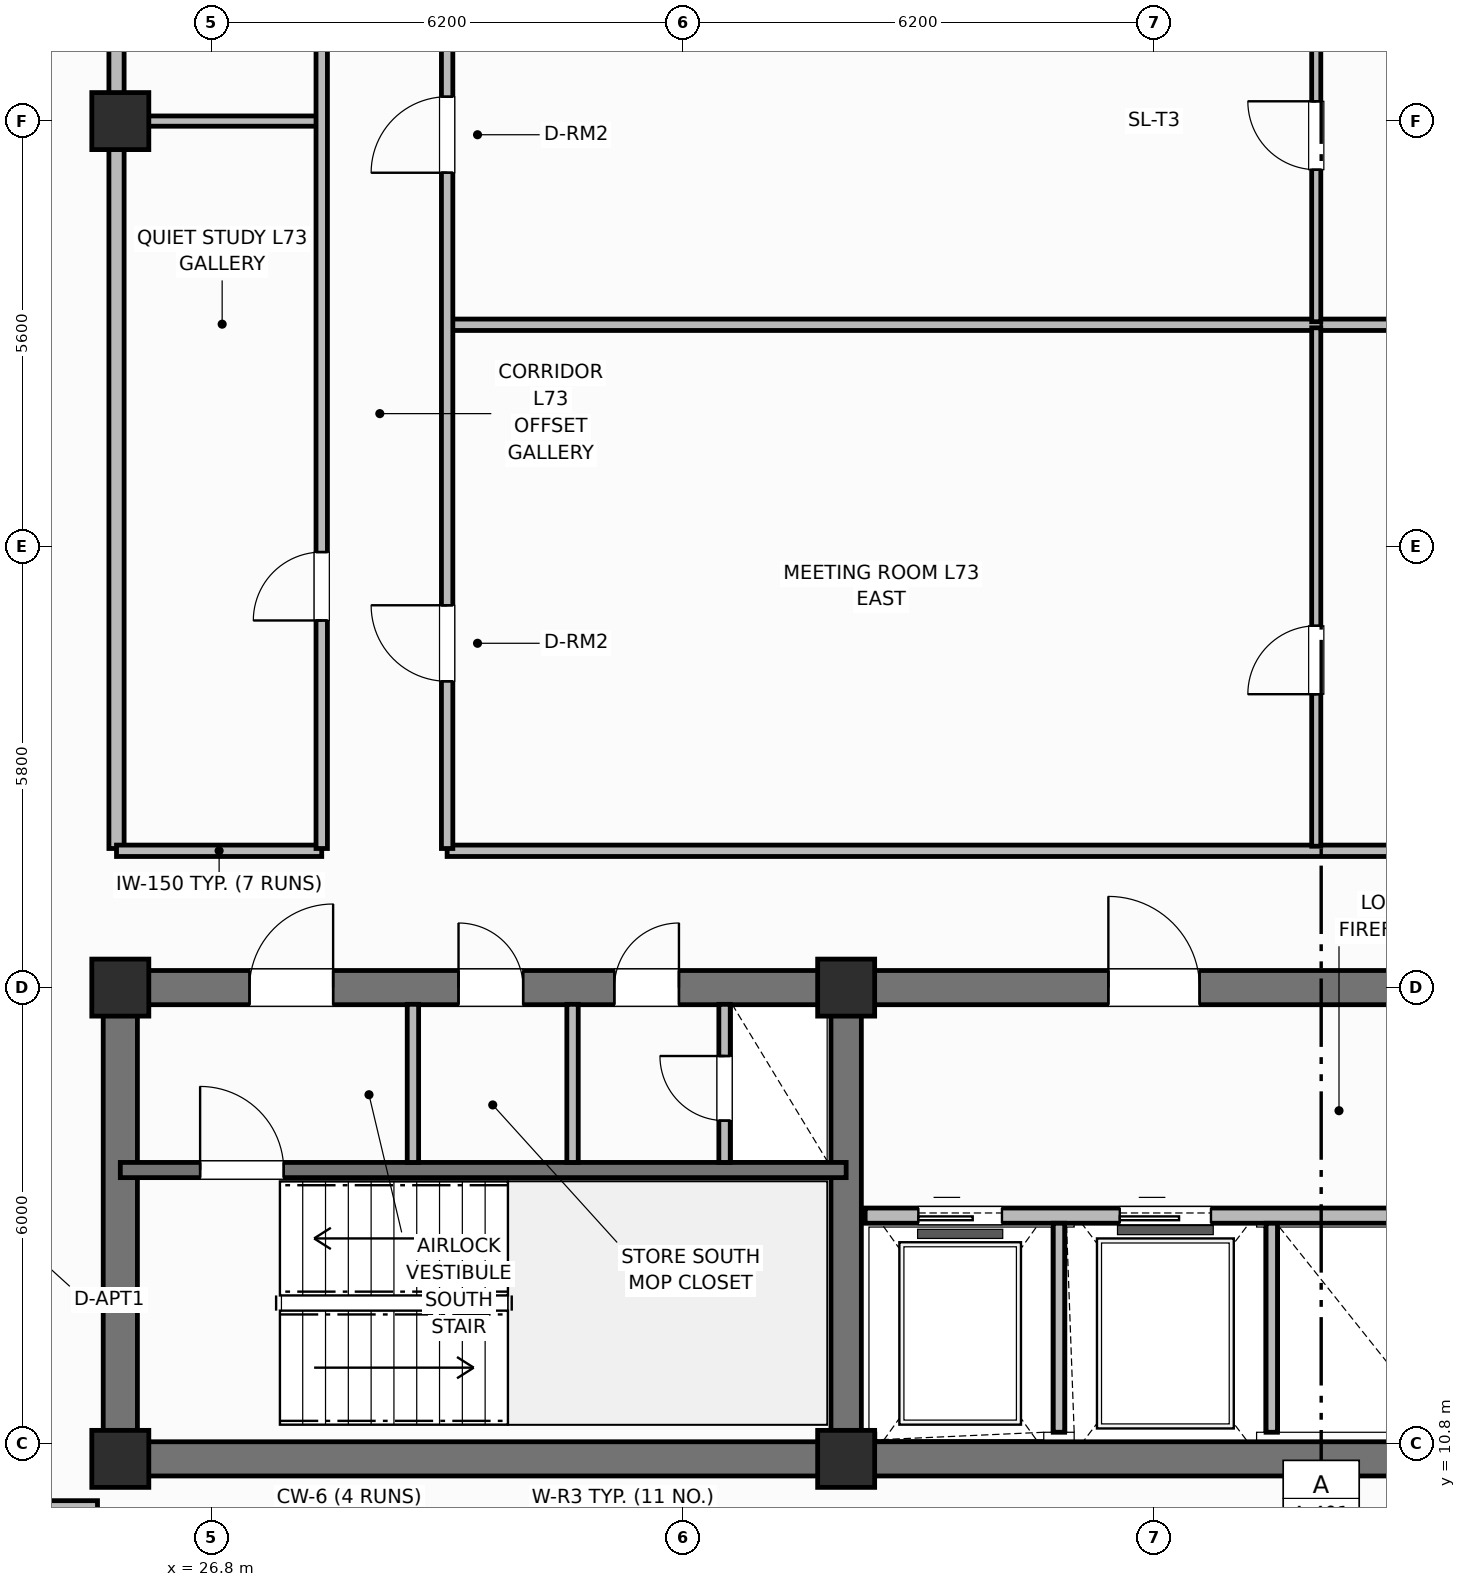
"""IFC4 building model, lengths in metres.
Left out: names, types, materials, properties, quantities, classifications, styles, units other than length and angle.
Written with IfcOpenShell. Run it as: python <this file> out.ifc"""

import sys

from ifc_helpers import new_model, si_unit, direction, frame, frame_2d, origin, origin_2d, place, context, subcontext, project, spatial, rectangle, extrude, element, fill, save


model = new_model("IFC4")
c1 = context("Model", 3, precision=1e-05, world=origin(), true_north=direction((0.0, 1.0)))
c2 = subcontext(c1, "Body", "Model", "MODEL_VIEW")
j1 = project(units=[si_unit("LENGTHUNIT", "METRE"), si_unit("PLANEANGLEUNIT", "RADIAN")], contexts=[c1])
p1 = place(None, origin())
s1 = spatial("IfcSite", under=j1, at=p1, CompositionType="ELEMENT")
p2 = place(p1, origin())
s2 = spatial("IfcBuilding", under=s1, at=p2, CompositionType="ELEMENT")
p3 = place(p2, frame((0.0, 0.0, 289.8)))
s3 = spatial("IfcBuildingStorey", under=s2, at=p3, CompositionType="ELEMENT", Elevation=289.8)
p4 = place(p3, frame((52.8, 10.6, 0.0), z_axis=(0.0, 0.0, 1.0), x_axis=(-1.0, 0.0, 0.0)))
e1 = element("IfcWall", 1, at=p4, inside=s3, PredefinedType="SHEAR", context=c2, shape_type="SweptSolid", body=[
    extrude(rectangle(XDim=27.2, YDim=0.45, at=frame_2d((13.6, 0.0))), origin(), (0.0, 0.0, 1.0), 3.7),
])
p5 = place(p3, frame((25.6, 10.825, 0.0), z_axis=(0.0, 0.0, 1.0), x_axis=(0.0, 1.0, 0.0)))
e2 = element("IfcWall", 2, at=p5, inside=s3, PredefinedType="SHEAR", context=c2, shape_type="SweptSolid", body=[
    extrude(rectangle(XDim=5.75, YDim=0.45, at=frame_2d((2.875, 0.0))), origin(), (0.0, 0.0, 1.0), 3.7),
])
p6 = place(p3, frame((25.6, 16.8, 0.0), z_axis=(0.0, 0.0, 1.0), x_axis=(1.0, 0.0, 0.0)))
e3 = element("IfcWall", 3, at=p6, inside=s3, PredefinedType="SHEAR", context=c2, shape_type="SweptSolid", body=[
    extrude(rectangle(XDim=27.2, YDim=0.45, at=frame_2d((13.6, 0.0))), origin(), (0.0, 0.0, 1.0), 3.7),
])
p7 = place(p6, frame((1.7, 0.0, 0.0)))
e4 = element("IfcOpeningElement", 4, at=p7, cuts=e3, PredefinedType="OPENING", context=c2, shape_type="SweptSolid", body=[
    extrude(rectangle(XDim=1.1, YDim=2.15, at=frame_2d((0.55, 1.075))), frame((0.0, 0.235, 0.0), z_axis=(0.0, -1.0, 0.0), x_axis=(1.0, 0.0, 0.0)), (0.0, 0.0, 1.0), 0.47),
])
p8 = place(p6, frame((4.45, 0.0, 0.0)))
e5 = element("IfcOpeningElement", 5, at=p8, cuts=e3, PredefinedType="OPENING", context=c2, shape_type="SweptSolid", body=[
    extrude(rectangle(XDim=0.85, YDim=2.1, at=frame_2d((0.425, 1.05))), frame((0.0, 0.235, 0.0), z_axis=(0.0, -1.0, 0.0), x_axis=(1.0, 0.0, 0.0)), (0.0, 0.0, 1.0), 0.47),
])
p9 = place(p6, frame((6.5, 0.0, 0.0)))
e6 = element("IfcOpeningElement", 6, at=p9, cuts=e3, PredefinedType="OPENING", context=c2, shape_type="SweptSolid", body=[
    extrude(rectangle(XDim=0.85, YDim=2.1, at=frame_2d((0.425, 1.05))), frame((0.0, 0.235, 0.0), z_axis=(0.0, -1.0, 0.0), x_axis=(1.0, 0.0, 0.0)), (0.0, 0.0, 1.0), 0.47),
])
p10 = place(p6, frame((13.0, 0.0, 0.0)))
e7 = element("IfcOpeningElement", 7, at=p10, cuts=e3, PredefinedType="OPENING", context=c2, shape_type="SweptSolid", body=[
    extrude(rectangle(XDim=1.2, YDim=2.15, at=frame_2d((0.6, 1.075))), frame((0.0, 0.235, 0.0), z_axis=(0.0, -1.0, 0.0), x_axis=(1.0, 0.0, 0.0)), (0.0, 0.0, 1.0), 0.47),
])
p11 = place(p6, frame((19.8, 0.0, 0.0)))
e8 = element("IfcOpeningElement", 8, at=p11, cuts=e3, PredefinedType="OPENING", context=c2, shape_type="SweptSolid", body=[
    extrude(rectangle(XDim=0.85, YDim=2.1, at=frame_2d((0.425, 1.05))), frame((0.0, 0.235, 0.0), z_axis=(0.0, -1.0, 0.0), x_axis=(1.0, 0.0, 0.0)), (0.0, 0.0, 1.0), 0.47),
])
p12 = place(p6, frame((24.2, 0.0, 0.0)))
e9 = element("IfcOpeningElement", 9, at=p12, cuts=e3, PredefinedType="OPENING", context=c2, shape_type="SweptSolid", body=[
    extrude(rectangle(XDim=0.85, YDim=2.1, at=frame_2d((0.425, 1.05))), frame((0.0, 0.235, 0.0), z_axis=(0.0, -1.0, 0.0), x_axis=(1.0, 0.0, 0.0)), (0.0, 0.0, 1.0), 0.47),
])
p13 = place(p3, frame((35.15, 10.825, 0.0), z_axis=(0.0, 0.0, 1.0), x_axis=(0.0, 1.0, 0.0)))
e10 = element("IfcWall", 10, at=p13, inside=s3, PredefinedType="SHEAR", context=c2, shape_type="SweptSolid", body=[
    extrude(rectangle(XDim=5.75, YDim=0.4, at=frame_2d((2.875, 0.0))), origin(), (0.0, 0.0, 1.0), 3.7),
])
for number, where, z_axis, x_axis in (
    (11, (25.6, 10.6, 0.0), (0.0, 0.0, 1.0), (1.0, 0.0, 0.0)),
    (12, (25.6, 16.8, 0.0), (0.0, 0.0, 1.0), (1.0, 0.0, 0.0)),
    (13, (35.15, 10.6, 0.0), (0.0, 0.0, 1.0), (1.0, 0.0, 0.0)),
    (14, (35.15, 16.8, 0.0), (0.0, 0.0, 1.0), (1.0, 0.0, 0.0)),
    (15, (25.6, 28.2, 0.0), (0.0, 0.0, 1.0), (1.0, 0.0, 0.0)),
):
    element("IfcColumn", number, at=place(p3, frame(where, z_axis=z_axis, x_axis=x_axis)), inside=s3, PredefinedType="COLUMN", context=c2, shape_type="SweptSolid", body=[
        extrude(rectangle(XDim=0.75, YDim=0.75, at=origin_2d()), origin(), (0.0, 0.0, 1.0), 3.7),
    ])
p14 = place(p3, frame((25.6, 14.4, 0.0), z_axis=(0.0, 0.0, 1.0), x_axis=(1.0, 0.0, 0.0)))
e16 = element("IfcWall", 16, at=p14, inside=s3, PredefinedType="SHEAR", context=c2, shape_type="SweptSolid", body=[
    extrude(rectangle(XDim=9.55, YDim=0.2, at=frame_2d((4.775, 0.0))), origin(), (0.0, 0.0, 1.0), 3.7),
])
p15 = place(p14, frame((1.05, 0.0, 0.0)))
e17 = element("IfcOpeningElement", 17, at=p15, cuts=e16, PredefinedType="OPENING", context=c2, shape_type="SweptSolid", body=[
    extrude(rectangle(XDim=1.1, YDim=2.15, at=frame_2d((0.55, 1.075))), frame((0.0, 0.11, 0.0), z_axis=(0.0, -1.0, 0.0), x_axis=(1.0, 0.0, 0.0)), (0.0, 0.0, 1.0), 0.22),
])
for number, where, z_axis, x_axis in (
    (18, (29.45, 14.5, 0.0), (0.0, 0.0, 1.0), (0.0, 1.0, 0.0)),
    (19, (31.55, 14.5, 0.0), (0.0, 0.0, 1.0), (0.0, 1.0, 0.0)),
):
    element("IfcWall", number, at=place(p3, frame(where, z_axis=z_axis, x_axis=x_axis)), inside=s3, PredefinedType="PARTITIONING", context=c2, shape_type="SweptSolid", body=[
        extrude(rectangle(XDim=2.08, YDim=0.15, at=frame_2d((1.04, 0.0))), origin(), (0.0, 0.0, 1.0), 2.56),
    ])
p16 = place(p3, frame((33.55, 14.5, 0.0), z_axis=(0.0, 0.0, 1.0), x_axis=(0.0, 1.0, 0.0)))
e20 = element("IfcWall", 20, at=p16, inside=s3, PredefinedType="PARTITIONING", context=c2, shape_type="SweptSolid", body=[
    extrude(rectangle(XDim=2.08, YDim=0.15, at=frame_2d((1.04, 0.0))), origin(), (0.0, 0.0, 1.0), 2.56),
])
p17 = place(p16, frame((0.55, 0.0, 0.0)))
e21 = element("IfcOpeningElement", 21, at=p17, cuts=e20, PredefinedType="OPENING", context=c2, shape_type="SweptSolid", body=[
    extrude(rectangle(XDim=0.85, YDim=2.05, at=frame_2d((0.425, 1.025))), frame((0.0, 0.085, 0.0), z_axis=(0.0, -1.0, 0.0), x_axis=(1.0, 0.0, 0.0)), (0.0, 0.0, 1.0), 0.17),
])
p18 = place(p3, frame((35.4, 13.8, 0.0), z_axis=(0.0, 0.0, 1.0), x_axis=(1.0, 0.0, 0.0)))
e22 = element("IfcWall", 22, at=p18, inside=s3, PredefinedType="PARTITIONING", context=c2, shape_type="SweptSolid", body=[
    extrude(rectangle(XDim=7.6, YDim=0.2, at=frame_2d((3.8, 0.0))), origin(), (0.0, 0.0, 1.0), 2.33),
])
p19 = place(p18, frame((0.7, 0.0, 0.0)))
e23 = element("IfcOpeningElement", 23, at=p19, cuts=e22, PredefinedType="OPENING", context=c2, shape_type="SweptSolid", body=[
    extrude(rectangle(XDim=1.1, YDim=2.15, at=frame_2d((0.55, 1.075))), frame((0.0, 0.11, 0.0), z_axis=(0.0, -1.0, 0.0), x_axis=(1.0, 0.0, 0.0)), (0.0, 0.0, 1.0), 0.22),
])
p20 = place(p18, frame((3.35, 0.0, 0.0)))
e24 = element("IfcOpeningElement", 24, at=p20, cuts=e22, PredefinedType="OPENING", context=c2, shape_type="SweptSolid", body=[
    extrude(rectangle(XDim=1.2, YDim=2.15, at=frame_2d((0.6, 1.075))), frame((0.0, 0.11, 0.0), z_axis=(0.0, -1.0, 0.0), x_axis=(1.0, 0.0, 0.0)), (0.0, 0.0, 1.0), 0.22),
])
for number, where, z_axis, x_axis in (
    (25, (37.95, 10.95, 0.0), (0.0, 0.0, 1.0), (0.0, 1.0, 0.0)),
    (26, (40.75, 10.95, 0.0), (0.0, 0.0, 1.0), (0.0, 1.0, 0.0)),
):
    element("IfcWall", number, at=place(p3, frame(where, z_axis=z_axis, x_axis=x_axis)), inside=s3, PredefinedType="PARTITIONING", context=c2, shape_type="SweptSolid", body=[
        extrude(rectangle(XDim=2.75, YDim=0.15, at=frame_2d((1.375, 0.0))), origin(), (0.0, 0.0, 1.0), 2.56),
    ])
p21 = place(p3, frame((25.55, 18.63, 0.0), z_axis=(0.0, 0.0, 1.0), x_axis=(0.0, 1.0, 0.0)))
e27 = element("IfcWall", 27, at=p21, inside=s3, PredefinedType="PARTITIONING", context=c2, shape_type="SweptSolid", body=[
    extrude(rectangle(XDim=19.14, YDim=0.2, at=frame_2d((9.57, 0.0))), origin(), (0.0, 0.0, 1.0), 2.56),
])
p22 = place(p3, frame((25.55, 18.6, 0.0), z_axis=(0.0, 0.0, 1.0), x_axis=(1.0, 0.0, 0.0)))
e28 = element("IfcWall", 28, at=p22, inside=s3, PredefinedType="PARTITIONING", context=c2, shape_type="SweptSolid", body=[
    extrude(rectangle(XDim=2.7, YDim=0.15, at=frame_2d((1.35, 0.0))), origin(), (0.0, 0.0, 1.0), 2.56),
])
p23 = place(p3, frame((29.9, 18.6, 0.0), z_axis=(0.0, 0.0, 1.0), x_axis=(1.0, 0.0, 0.0)))
e29 = element("IfcWall", 29, at=p23, inside=s3, PredefinedType="PARTITIONING", context=c2, shape_type="SweptSolid", body=[
    extrude(rectangle(XDim=22.95, YDim=0.15, at=frame_2d((11.475, 0.0))), origin(), (0.0, 0.0, 1.0), 2.56),
])
p24 = place(p3, frame((25.6, 28.2, 0.0), z_axis=(0.0, 0.0, 1.0), x_axis=(1.0, 0.0, 0.0)))
e30 = element("IfcWall", 30, at=p24, inside=s3, PredefinedType="PARTITIONING", context=c2, shape_type="SweptSolid", body=[
    extrude(rectangle(XDim=2.66, YDim=0.135, at=frame_2d((1.33, 0.0))), origin(), (0.0, 0.0, 1.0), 2.56),
])
p25 = place(p3, frame((29.93, 25.521, 0.0), z_axis=(0.0, 0.0, 1.0), x_axis=(1.0, 0.0, 0.0)))
e31 = element("IfcWall", 31, at=p25, inside=s3, PredefinedType="PARTITIONING", context=c2, shape_type="SweptSolid", body=[
    extrude(rectangle(XDim=22.87, YDim=0.15, at=frame_2d((11.435, 0.0))), origin(), (0.0, 0.0, 1.0), 2.56),
])
p26 = place(p3, frame((41.335, 18.66, 0.0), z_axis=(0.0, 0.0, 1.0), x_axis=(0.0, 1.0, 0.0)))
e32 = element("IfcWall", 32, at=p26, inside=s3, PredefinedType="PARTITIONING", context=c2, shape_type="SweptSolid", body=[
    extrude(rectangle(XDim=6.821, YDim=0.12, at=frame_2d((3.41, 0.0))), origin(), (0.0, 0.0, 1.0), 2.56),
])
p27 = place(p26, frame((2.0, 0.0, 0.0)))
e33 = element("IfcOpeningElement", 33, at=p27, cuts=e32, PredefinedType="OPENING", context=c2, shape_type="SweptSolid", body=[
    extrude(rectangle(XDim=0.9, YDim=2.1, at=frame_2d((0.45, 1.05))), frame((0.0, 0.07, 0.0), z_axis=(0.0, -1.0, 0.0), x_axis=(1.0, 0.0, 0.0)), (0.0, 0.0, 1.0), 0.14),
])
p28 = place(p3, frame((41.335, 25.56, 0.0), z_axis=(0.0, 0.0, 1.0), x_axis=(0.0, 1.0, 0.0)))
e34 = element("IfcWall", 34, at=p28, inside=s3, PredefinedType="PARTITIONING", context=c2, shape_type="SweptSolid", body=[
    extrude(rectangle(XDim=12.18, YDim=0.12, at=frame_2d((6.09, 0.0))), origin(), (0.0, 0.0, 1.0), 2.56),
])
p29 = place(p28, frame((2.0, 0.0, 0.0)))
e35 = element("IfcOpeningElement", 35, at=p29, cuts=e34, PredefinedType="OPENING", context=c2, shape_type="SweptSolid", body=[
    extrude(rectangle(XDim=0.9, YDim=2.1, at=frame_2d((0.45, 1.05))), frame((0.0, 0.07, 0.0), z_axis=(0.0, -1.0, 0.0), x_axis=(1.0, 0.0, 0.0)), (0.0, 0.0, 1.0), 0.14),
])
p30 = place(p3, frame((28.25, 18.63, 0.0), z_axis=(0.0, 0.0, 1.0), x_axis=(0.0, 1.0, 0.0)))
e36 = element("IfcWall", 36, at=p30, inside=s3, PredefinedType="PARTITIONING", context=c2, shape_type="SweptSolid", body=[
    extrude(rectangle(XDim=19.14, YDim=0.15, at=frame_2d((9.57, 0.0))), origin(), (0.0, 0.0, 1.0), 2.56),
])
p31 = place(p30, frame((3.0, 0.0, 0.0)))
e37 = element("IfcOpeningElement", 37, at=p31, cuts=e36, PredefinedType="OPENING", context=c2, shape_type="SweptSolid", body=[
    extrude(rectangle(XDim=0.9, YDim=2.1, at=frame_2d((0.45, 1.05))), frame((0.0, 0.085, 0.0), z_axis=(0.0, -1.0, 0.0), x_axis=(1.0, 0.0, 0.0)), (0.0, 0.0, 1.0), 0.17),
])
p32 = place(p30, frame((11.5, 0.0, 0.0)))
e38 = element("IfcOpeningElement", 38, at=p32, cuts=e36, PredefinedType="OPENING", context=c2, shape_type="SweptSolid", body=[
    extrude(rectangle(XDim=0.9, YDim=2.1, at=frame_2d((0.45, 1.05))), frame((0.0, 0.085, 0.0), z_axis=(0.0, -1.0, 0.0), x_axis=(1.0, 0.0, 0.0)), (0.0, 0.0, 1.0), 0.17),
])
p33 = place(p3, frame((29.9, 18.63, 0.0), z_axis=(0.0, 0.0, 1.0), x_axis=(0.0, 1.0, 0.0)))
e39 = element("IfcWall", 39, at=p33, inside=s3, PredefinedType="PARTITIONING", context=c2, shape_type="SweptSolid", body=[
    extrude(rectangle(XDim=19.14, YDim=0.15, at=frame_2d((9.57, 0.0))), origin(), (0.0, 0.0, 1.0), 2.56),
])
p34 = place(p33, frame((2.2, 0.0, 0.0)))
e40 = element("IfcOpeningElement", 40, at=p34, cuts=e39, PredefinedType="OPENING", context=c2, shape_type="SweptSolid", body=[
    extrude(rectangle(XDim=1.0, YDim=2.15, at=frame_2d((0.5, 1.075))), frame((0.0, 0.085, 0.0), z_axis=(0.0, -1.0, 0.0), x_axis=(1.0, 0.0, 0.0)), (0.0, 0.0, 1.0), 0.17),
])
p35 = place(p33, frame((8.89, 0.0, 0.0)))
e41 = element("IfcOpeningElement", 41, at=p35, cuts=e39, PredefinedType="OPENING", context=c2, shape_type="SweptSolid", body=[
    extrude(rectangle(XDim=1.0, YDim=2.15, at=frame_2d((0.5, 1.075))), frame((0.0, 0.085, 0.0), z_axis=(0.0, -1.0, 0.0), x_axis=(1.0, 0.0, 0.0)), (0.0, 0.0, 1.0), 0.17),
])
p36 = place(p3, frame((21.546, 9.95, 0.0), z_axis=(0.0, 0.0, 1.0), x_axis=(1.0, 0.0, 0.0)))
e42 = element("IfcWall", 42, at=p36, inside=s3, PredefinedType="PARTITIONING", context=c2, shape_type="SweptSolid", body=[
    extrude(rectangle(XDim=3.754, YDim=0.2, at=frame_2d((1.877, 0.0))), origin(), (0.0, 0.0, 1.0), 2.56),
])
p37 = place(p15, origin())
e43 = element("IfcDoor", 43, at=p37, inside=s3, OperationType="SINGLE_SWING_LEFT", PredefinedType="DOOR", context=c2, shape_type="SweptSolid", body=[
    extrude(rectangle(XDim=1.1, YDim=2.15, at=frame_2d((0.55, 1.075))), frame((0.0, 0.025, 0.0), z_axis=(0.0, -1.0, 0.0), x_axis=(1.0, 0.0, 0.0)), (0.0, 0.0, 1.0), 0.05),
])
fill(e17, e43)
p38 = place(p17, origin())
e44 = element("IfcDoor", 44, at=p38, inside=s3, OperationType="SINGLE_SWING_RIGHT", PredefinedType="TRAPDOOR", context=c2, shape_type="SweptSolid", body=[
    extrude(rectangle(XDim=0.85, YDim=2.05, at=frame_2d((0.425, 1.025))), frame((0.0, 0.025, 0.0), z_axis=(0.0, -1.0, 0.0), x_axis=(1.0, 0.0, 0.0)), (0.0, 0.0, 1.0), 0.05),
])
fill(e21, e44)
p39 = place(p19, origin())
e45 = element("IfcDoor", 45, at=p39, inside=s3, OperationType="SLIDING_TO_LEFT", PredefinedType="DOOR", context=c2, shape_type="SweptSolid", body=[
    extrude(rectangle(XDim=1.1, YDim=2.15, at=frame_2d((0.55, 1.075))), frame((0.0, 0.025, 0.0), z_axis=(0.0, -1.0, 0.0), x_axis=(1.0, 0.0, 0.0)), (0.0, 0.0, 1.0), 0.05),
])
fill(e23, e45)
p40 = place(p20, origin())
e46 = element("IfcDoor", 46, at=p40, inside=s3, OperationType="SLIDING_TO_LEFT", PredefinedType="DOOR", context=c2, shape_type="SweptSolid", body=[
    extrude(rectangle(XDim=1.2, YDim=2.15, at=frame_2d((0.6, 1.075))), frame((0.0, 0.025, 0.0), z_axis=(0.0, -1.0, 0.0), x_axis=(1.0, 0.0, 0.0)), (0.0, 0.0, 1.0), 0.05),
])
fill(e24, e46)
p41 = place(p27, origin())
e47 = element("IfcDoor", 47, at=p41, inside=s3, OperationType="SINGLE_SWING_LEFT", PredefinedType="DOOR", context=c2, shape_type="SweptSolid", body=[
    extrude(rectangle(XDim=0.9, YDim=2.1, at=frame_2d((0.45, 1.05))), frame((0.0, 0.025, 0.0), z_axis=(0.0, -1.0, 0.0), x_axis=(1.0, 0.0, 0.0)), (0.0, 0.0, 1.0), 0.05),
])
fill(e33, e47)
p42 = place(p29, origin())
e48 = element("IfcDoor", 48, at=p42, inside=s3, OperationType="SINGLE_SWING_RIGHT", PredefinedType="DOOR", context=c2, shape_type="SweptSolid", body=[
    extrude(rectangle(XDim=0.9, YDim=2.1, at=frame_2d((0.45, 1.05))), frame((0.0, 0.025, 0.0), z_axis=(0.0, -1.0, 0.0), x_axis=(1.0, 0.0, 0.0)), (0.0, 0.0, 1.0), 0.05),
])
fill(e35, e48)
p43 = place(p31, origin())
e49 = element("IfcDoor", 49, at=p43, inside=s3, OperationType="SINGLE_SWING_LEFT", PredefinedType="DOOR", context=c2, shape_type="SweptSolid", body=[
    extrude(rectangle(XDim=0.9, YDim=2.1, at=frame_2d((0.45, 1.05))), frame((0.0, 0.025, 0.0), z_axis=(0.0, -1.0, 0.0), x_axis=(1.0, 0.0, 0.0)), (0.0, 0.0, 1.0), 0.05),
])
fill(e37, e49)
p44 = place(p34, origin())
e50 = element("IfcDoor", 50, at=p44, inside=s3, OperationType="SINGLE_SWING_RIGHT", PredefinedType="DOOR", context=c2, shape_type="SweptSolid", body=[
    extrude(rectangle(XDim=1.0, YDim=2.15, at=frame_2d((0.5, 1.075))), frame((0.0, 0.025, 0.0), z_axis=(0.0, -1.0, 0.0), x_axis=(1.0, 0.0, 0.0)), (0.0, 0.0, 1.0), 0.05),
])
fill(e40, e50)
p45 = place(p35, origin())
e51 = element("IfcDoor", 51, at=p45, inside=s3, OperationType="SINGLE_SWING_LEFT", PredefinedType="DOOR", context=c2, shape_type="SweptSolid", body=[
    extrude(rectangle(XDim=1.0, YDim=2.15, at=frame_2d((0.5, 1.075))), frame((0.0, 0.025, 0.0), z_axis=(0.0, -1.0, 0.0), x_axis=(1.0, 0.0, 0.0)), (0.0, 0.0, 1.0), 0.05),
])
fill(e41, e51)
p46 = place(p7, origin())
e52 = element("IfcDoor", 52, at=p46, inside=s3, OperationType="SINGLE_SWING_RIGHT", PredefinedType="DOOR", context=c2, shape_type="SweptSolid", body=[
    extrude(rectangle(XDim=1.1, YDim=2.15, at=frame_2d((0.55, 1.075))), frame((0.0, 0.025, 0.0), z_axis=(0.0, -1.0, 0.0), x_axis=(1.0, 0.0, 0.0)), (0.0, 0.0, 1.0), 0.05),
])
fill(e4, e52)
p47 = place(p8, origin())
e53 = element("IfcDoor", 53, at=p47, inside=s3, OperationType="SINGLE_SWING_LEFT", PredefinedType="DOOR", context=c2, shape_type="SweptSolid", body=[
    extrude(rectangle(XDim=0.85, YDim=2.1, at=frame_2d((0.425, 1.05))), frame((0.0, 0.025, 0.0), z_axis=(0.0, -1.0, 0.0), x_axis=(1.0, 0.0, 0.0)), (0.0, 0.0, 1.0), 0.05),
])
fill(e5, e53)
p48 = place(p9, origin())
e54 = element("IfcDoor", 54, at=p48, inside=s3, OperationType="SINGLE_SWING_RIGHT", PredefinedType="DOOR", context=c2, shape_type="SweptSolid", body=[
    extrude(rectangle(XDim=0.85, YDim=2.1, at=frame_2d((0.425, 1.05))), frame((0.0, 0.025, 0.0), z_axis=(0.0, -1.0, 0.0), x_axis=(1.0, 0.0, 0.0)), (0.0, 0.0, 1.0), 0.05),
])
fill(e6, e54)
p49 = place(p10, origin())
e55 = element("IfcDoor", 55, at=p49, inside=s3, OperationType="SINGLE_SWING_LEFT", PredefinedType="DOOR", context=c2, shape_type="SweptSolid", body=[
    extrude(rectangle(XDim=1.2, YDim=2.15, at=frame_2d((0.6, 1.075))), frame((0.0, 0.025, 0.0), z_axis=(0.0, -1.0, 0.0), x_axis=(1.0, 0.0, 0.0)), (0.0, 0.0, 1.0), 0.05),
])
fill(e7, e55)
save(model, sys.argv[1])
